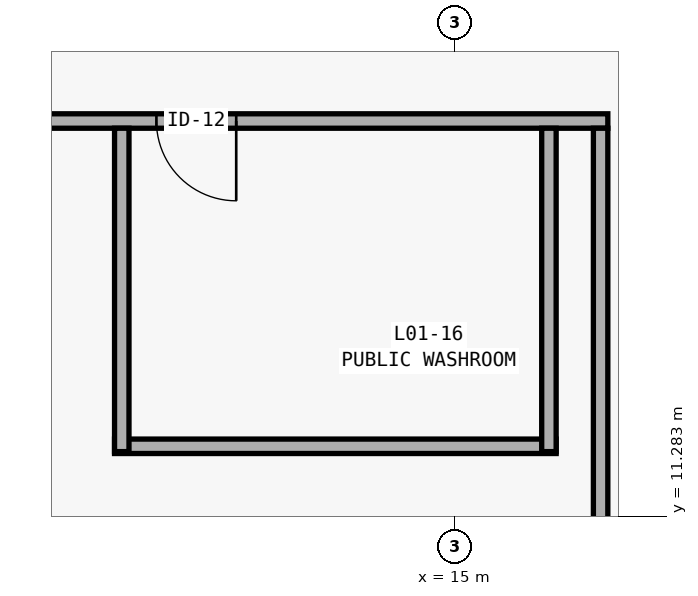
"""IFC4 building model, lengths in metres.
Left out: names, types, materials, properties, quantities, classifications, styles, units other than length and angle.
Written with IfcOpenShell. Run it as: python <this file> out.ifc"""

import sys

from ifc_helpers import new_model, si_unit, direction, frame, frame_2d, origin, place, context, subcontext, project, spatial, rectangle, extrude, element, fill, save


model = new_model("IFC4")
c1 = context("Model", 3, precision=1e-05, world=origin(), true_north=direction((0.0, 1.0)))
c2 = subcontext(c1, "Body", "Model", "MODEL_VIEW")
j1 = project(units=[si_unit("LENGTHUNIT", "METRE"), si_unit("PLANEANGLEUNIT", "RADIAN")], contexts=[c1])
p1 = place(None, origin())
s1 = spatial("IfcSite", under=j1, at=p1, CompositionType="ELEMENT")
p2 = place(p1, origin())
s2 = spatial("IfcBuilding", under=s1, at=p2, CompositionType="ELEMENT")
p3 = place(p2, frame((0.0, 0.0, 4.8)))
s3 = spatial("IfcBuildingStorey", under=s2, at=p3, CompositionType="ELEMENT", Elevation=4.8)
p4 = place(p3, frame((10.525, 12.2, 0.0), z_axis=(0.0, 0.0, 1.0), x_axis=(1.0, 0.0, 0.0)))
e1 = element("IfcWall", 1, at=p4, inside=s3, PredefinedType="PARTITIONING", context=c2, shape_type="SweptSolid", body=[
    extrude(rectangle(XDim=5.81, YDim=0.19, at=frame_2d((2.905, 0.0))), origin(), (0.0, 0.0, 1.0), 2.76),
])
p5 = place(p3, frame((4.71, 16.48, 0.0), z_axis=(0.0, 0.0, 1.0), x_axis=(1.0, 0.0, 0.0)))
e2 = element("IfcWall", 2, at=p5, inside=s3, PredefinedType="PARTITIONING", context=c2, shape_type="SweptSolid", body=[
    extrude(rectangle(XDim=12.305, YDim=0.19, at=frame_2d((6.152, 0.0))), origin(), (0.0, 0.0, 1.0), 2.76),
])
p6 = place(p5, frame((6.366, 0.0, 0.0)))
e3 = element("IfcOpeningElement", 3, at=p6, cuts=e2, PredefinedType="OPENING", context=c2, shape_type="SweptSolid", body=[
    extrude(rectangle(XDim=1.05, YDim=2.1, at=frame_2d((0.525, 1.05))), frame((0.0, 0.11, 0.0), z_axis=(0.0, -1.0, 0.0), x_axis=(1.0, 0.0, 0.0)), (0.0, 0.0, 1.0), 0.22),
])
for number, where, z_axis, x_axis in (
    (4, (10.62, 12.13, 0.0), (0.0, 0.0, 1.0), (0.0, 1.0, 0.0)),
    (5, (16.24, 12.13, 0.0), (0.0, 0.0, 1.0), (0.0, 1.0, 0.0)),
):
    element("IfcWall", number, at=place(p3, frame(where, z_axis=z_axis, x_axis=x_axis)), inside=s3, PredefinedType="PARTITIONING", context=c2, shape_type="SweptSolid", body=[
        extrude(rectangle(XDim=4.255, YDim=0.19, at=frame_2d((2.127, 0.0))), origin(), (0.0, 0.0, 1.0), 2.76),
    ])
p7 = place(p3, frame((16.92, 3.115, 0.0), z_axis=(0.0, 0.0, 1.0), x_axis=(0.0, 1.0, 0.0)))
e6 = element("IfcWall", 6, at=p7, inside=s3, PredefinedType="PARTITIONING", context=c2, shape_type="SweptSolid", body=[
    extrude(rectangle(XDim=13.27, YDim=0.19, at=frame_2d((6.635, 0.0))), origin(), (0.0, 0.0, 1.0), 2.76),
])
p8 = place(p7, frame((2.525, 0.0, 0.0)))
e7 = element("IfcOpeningElement", 7, at=p8, cuts=e6, PredefinedType="OPENING", context=c2, shape_type="SweptSolid", body=[
    extrude(rectangle(XDim=1.85, YDim=2.35, at=frame_2d((0.925, 1.175))), frame((0.0, 0.11, 0.0), z_axis=(0.0, -1.0, 0.0), x_axis=(1.0, 0.0, 0.0)), (0.0, 0.0, 1.0), 0.22),
])
p9 = place(p6, frame((1.05, 0.0, 0.0), z_axis=(0.0, 0.0, 1.0), x_axis=(-1.0, 0.0, 0.0)))
e8 = element("IfcDoor", 8, at=p9, inside=s3, OperationType="SINGLE_SWING_RIGHT", PredefinedType="DOOR", context=c2, shape_type="SweptSolid", body=[
    extrude(rectangle(XDim=1.05, YDim=2.1, at=frame_2d((0.525, 1.05))), frame((0.0, 0.025, 0.0), z_axis=(0.0, -1.0, 0.0), x_axis=(1.0, 0.0, 0.0)), (0.0, 0.0, 1.0), 0.05),
])
fill(e3, e8)
save(model, sys.argv[1])
